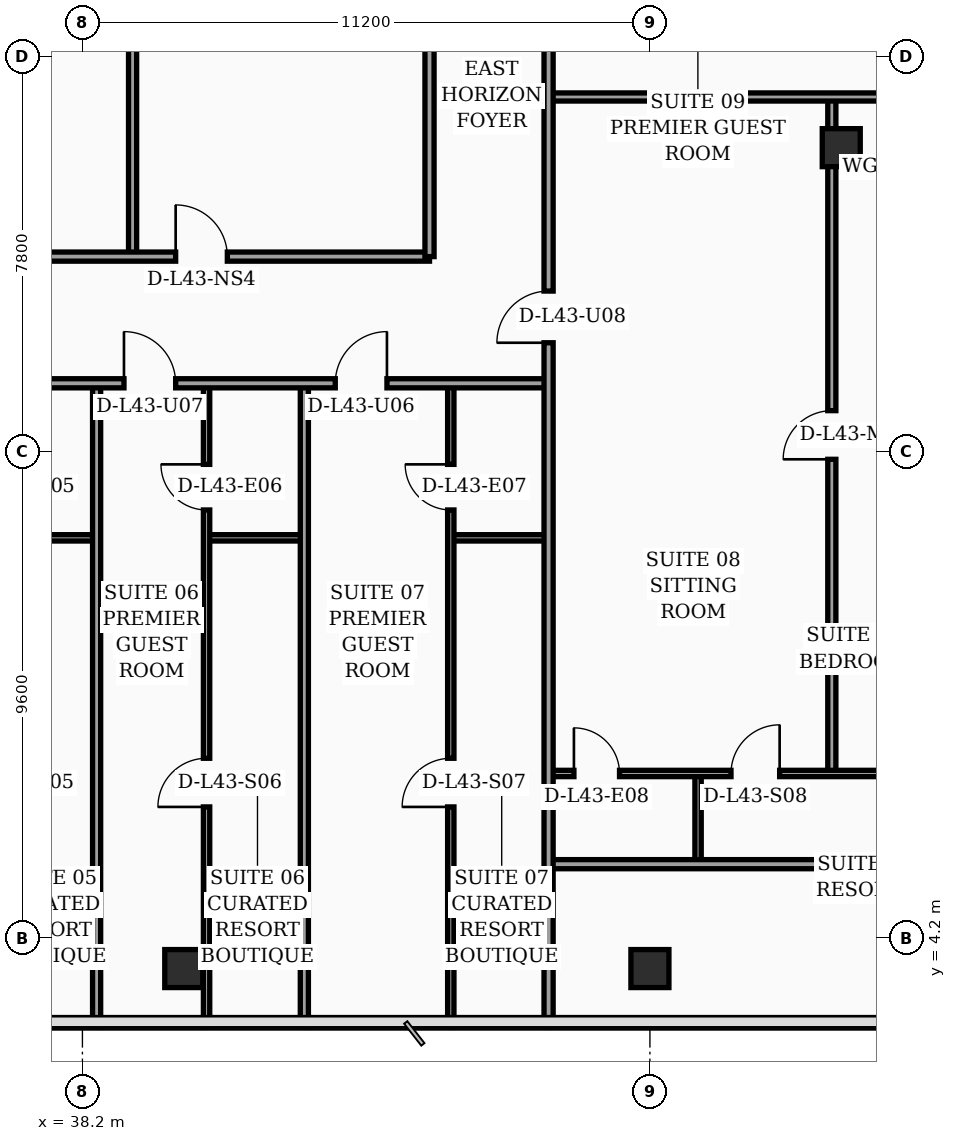
"""IFC4 building model, lengths in metres.
Left out: names, types, materials, properties, quantities, classifications, styles, units other than length and angle.
Written with IfcOpenShell. Run it as: python <this file> out.ifc"""

import sys

from ifc_helpers import new_model, si_unit, direction, frame, frame_2d, origin, origin_2d, place, context, subcontext, project, spatial, rectangle, hollow_rectangle, extrude, element, fill, save


model = new_model("IFC4")
c1 = context("Model", 3, precision=1e-05, world=origin(), true_north=direction((0.0, 1.0)))
c2 = subcontext(c1, "Body", "Model", "MODEL_VIEW")
j1 = project(units=[si_unit("LENGTHUNIT", "METRE"), si_unit("PLANEANGLEUNIT", "RADIAN")], contexts=[c1])
p1 = place(None, origin())
s1 = spatial("IfcSite", under=j1, at=p1, CompositionType="ELEMENT")
p2 = place(p1, origin())
s2 = spatial("IfcBuilding", under=s1, at=p2, CompositionType="ELEMENT")
p3 = place(p2, frame((0.0, 0.0, 175.1)))
s3 = spatial("IfcBuildingStorey", under=s2, at=p3, CompositionType="ELEMENT", Elevation=175.1)
for number, where, z_axis, x_axis in (
    (1, (40.2, 3.6, 0.0), (0.0, 0.0, 1.0), (1.0, 0.0, 0.0)),
    (2, (49.4, 3.6, 0.0), (0.0, 0.0, 1.0), (1.0, 0.0, 0.0)),
    (3, (53.176, 19.8, 0.0), (0.0, 0.0, 1.0), (1.0, 0.0, 0.0)),
):
    element("IfcColumn", number, at=place(p3, frame(where, z_axis=z_axis, x_axis=x_axis)), inside=s3, PredefinedType="COLUMN", context=c2, shape_type="SweptSolid", body=[
        extrude(hollow_rectangle(XDim=0.75, YDim=0.75, WallThickness=0.032, at=origin_2d()), origin(), (0.0, 0.0, 1.0), 3.56),
    ])
p4 = place(p3, frame((59.23, 5.505, 0.0), z_axis=(0.0, 0.0, 1.0), x_axis=(-0.300509063924, 0.953778958931, 0.0)))
e4 = element("IfcWall", 4, at=p4, inside=s3, PredefinedType="SOLIDWALL", context=c2, shape_type="SweptSolid", body=[
    extrude(rectangle(XDim=30.814, YDim=0.32, at=frame_2d((15.407, 0.0))), origin(), (0.0, 0.0, 1.0), 3.56),
])
p5 = place(p4, frame((10.199, 0.0, 0.0)))
e5 = element("IfcOpeningElement", 5, at=p5, cuts=e4, PredefinedType="OPENING", context=c2, shape_type="SweptSolid", body=[
    extrude(rectangle(XDim=1.4, YDim=2.25, at=frame_2d((0.7, 1.125))), frame((0.0, 0.17, 0.0), z_axis=(0.0, -1.0, 0.0), x_axis=(1.0, 0.0, 0.0)), (0.0, 0.0, 1.0), 0.34),
])
p6 = place(p4, frame((2.65, 0.0, 0.75)))
e6 = element("IfcOpeningElement", 6, at=p6, cuts=e4, PredefinedType="OPENING", context=c2, shape_type="SweptSolid", body=[
    extrude(rectangle(XDim=1.5, YDim=1.6, at=frame_2d((0.75, 0.8))), frame((0.0, 0.17, 0.0), z_axis=(0.0, -1.0, 0.0), x_axis=(1.0, 0.0, 0.0)), (0.0, 0.0, 1.0), 0.34),
])
p7 = place(p4, frame((4.7, 0.0, 0.75)))
e7 = element("IfcOpeningElement", 7, at=p7, cuts=e4, PredefinedType="OPENING", context=c2, shape_type="SweptSolid", body=[
    extrude(rectangle(XDim=1.5, YDim=1.6, at=frame_2d((0.75, 0.8))), frame((0.0, 0.17, 0.0), z_axis=(0.0, -1.0, 0.0), x_axis=(1.0, 0.0, 0.0)), (0.0, 0.0, 1.0), 0.34),
])
p8 = place(p4, frame((7.8, 0.0, 0.75)))
e8 = element("IfcOpeningElement", 8, at=p8, cuts=e4, PredefinedType="OPENING", context=c2, shape_type="SweptSolid", body=[
    extrude(rectangle(XDim=1.5, YDim=1.6, at=frame_2d((0.75, 0.8))), frame((0.0, 0.17, 0.0), z_axis=(0.0, -1.0, 0.0), x_axis=(1.0, 0.0, 0.0)), (0.0, 0.0, 1.0), 0.34),
])
p9 = place(p4, frame((14.0, 0.0, 0.75)))
e9 = element("IfcOpeningElement", 9, at=p9, cuts=e4, PredefinedType="OPENING", context=c2, shape_type="SweptSolid", body=[
    extrude(rectangle(XDim=1.5, YDim=1.6, at=frame_2d((0.75, 0.8))), frame((0.0, 0.17, 0.0), z_axis=(0.0, -1.0, 0.0), x_axis=(1.0, 0.0, 0.0)), (0.0, 0.0, 1.0), 0.34),
])
p10 = place(p4, frame((17.1, 0.0, 0.75)))
e10 = element("IfcOpeningElement", 10, at=p10, cuts=e4, PredefinedType="OPENING", context=c2, shape_type="SweptSolid", body=[
    extrude(rectangle(XDim=1.5, YDim=1.6, at=frame_2d((0.75, 0.8))), frame((0.0, 0.17, 0.0), z_axis=(0.0, -1.0, 0.0), x_axis=(1.0, 0.0, 0.0)), (0.0, 0.0, 1.0), 0.34),
])
p11 = place(p4, frame((20.2, 0.0, 0.75)))
e11 = element("IfcOpeningElement", 11, at=p11, cuts=e4, PredefinedType="OPENING", context=c2, shape_type="SweptSolid", body=[
    extrude(rectangle(XDim=1.5, YDim=1.6, at=frame_2d((0.75, 0.8))), frame((0.0, 0.17, 0.0), z_axis=(0.0, -1.0, 0.0), x_axis=(1.0, 0.0, 0.0)), (0.0, 0.0, 1.0), 0.34),
])
p12 = place(p4, frame((26.4, 0.0, 0.75)))
e12 = element("IfcOpeningElement", 12, at=p12, cuts=e4, PredefinedType="OPENING", context=c2, shape_type="SweptSolid", body=[
    extrude(rectangle(XDim=1.5, YDim=1.6, at=frame_2d((0.75, 0.8))), frame((0.0, 0.17, 0.0), z_axis=(0.0, -1.0, 0.0), x_axis=(1.0, 0.0, 0.0)), (0.0, 0.0, 1.0), 0.34),
])
p13 = place(p3, frame((36.55, 12.1, 0.0), z_axis=(0.0, 0.0, 1.0), x_axis=(1.0, 0.0, 0.0)))
e13 = element("IfcWall", 13, at=p13, inside=s3, PredefinedType="PARTITIONING", context=c2, shape_type="SweptSolid", body=[
    extrude(rectangle(XDim=1.93, YDim=0.125, at=frame_2d((0.965, 0.0))), origin(), (0.0, 0.0, 1.0), 3.56),
])
p14 = place(p3, frame((40.65, 12.1, 0.0), z_axis=(0.0, 0.0, 1.0), x_axis=(1.0, 0.0, 0.0)))
e14 = element("IfcWall", 14, at=p14, inside=s3, PredefinedType="PARTITIONING", context=c2, shape_type="SweptSolid", body=[
    extrude(rectangle(XDim=1.93, YDim=0.125, at=frame_2d((0.965, 0.0))), origin(), (0.0, 0.0, 1.0), 3.56),
])
p15 = place(p3, frame((40.65, 2.44, 0.0), z_axis=(0.0, 0.0, 1.0), x_axis=(0.0, 1.0, 0.0)))
e15 = element("IfcWall", 15, at=p15, inside=s3, PredefinedType="PARTITIONING", context=c2, shape_type="SweptSolid", body=[
    extrude(rectangle(XDim=12.71, YDim=0.125, at=frame_2d((6.355, 0.0))), origin(), (0.0, 0.0, 1.0), 2.94),
])
p16 = place(p15, frame((4.35, 0.0, 0.0)))
e16 = element("IfcOpeningElement", 16, at=p16, cuts=e15, PredefinedType="OPENING", context=c2, shape_type="SweptSolid", body=[
    extrude(rectangle(XDim=0.96, YDim=2.2, at=frame_2d((0.48, 1.1))), frame((0.0, 0.073, 0.0), z_axis=(0.0, -1.0, 0.0), x_axis=(1.0, 0.0, 0.0)), (0.0, 0.0, 1.0), 0.145),
])
p17 = place(p15, frame((10.21, 0.0, 0.0)))
e17 = element("IfcOpeningElement", 17, at=p17, cuts=e15, PredefinedType="OPENING", context=c2, shape_type="SweptSolid", body=[
    extrude(rectangle(XDim=0.9, YDim=2.15, at=frame_2d((0.45, 1.075))), frame((0.0, 0.073, 0.0), z_axis=(0.0, -1.0, 0.0), x_axis=(1.0, 0.0, 0.0)), (0.0, 0.0, 1.0), 0.145),
])
p18 = place(p3, frame((38.48, 2.44, 0.0), z_axis=(0.0, 0.0, 1.0), x_axis=(0.0, 1.0, 0.0)))
e18 = element("IfcWall", 18, at=p18, inside=s3, PredefinedType="PARTITIONING", context=c2, shape_type="SweptSolid", body=[
    extrude(rectangle(XDim=12.71, YDim=0.16, at=frame_2d((6.355, 0.0))), origin(), (0.0, 0.0, 1.0), 2.94),
])
p19 = place(p3, frame((45.47, 12.1, 0.0), z_axis=(0.0, 0.0, 1.0), x_axis=(1.0, 0.0, 0.0)))
e19 = element("IfcWall", 19, at=p19, inside=s3, PredefinedType="PARTITIONING", context=c2, shape_type="SweptSolid", body=[
    extrude(rectangle(XDim=1.93, YDim=0.125, at=frame_2d((0.965, 0.0))), origin(), (0.0, 0.0, 1.0), 2.94),
])
p20 = place(p3, frame((45.47, 2.44, 0.0), z_axis=(0.0, 0.0, 1.0), x_axis=(0.0, 1.0, 0.0)))
e20 = element("IfcWall", 20, at=p20, inside=s3, PredefinedType="PARTITIONING", context=c2, shape_type="SweptSolid", body=[
    extrude(rectangle(XDim=12.71, YDim=0.125, at=frame_2d((6.355, 0.0))), origin(), (0.0, 0.0, 1.0), 3.04),
])
p21 = place(p20, frame((4.35, 0.0, 0.0)))
e21 = element("IfcOpeningElement", 21, at=p21, cuts=e20, PredefinedType="OPENING", context=c2, shape_type="SweptSolid", body=[
    extrude(rectangle(XDim=0.96, YDim=2.2, at=frame_2d((0.48, 1.1))), frame((0.0, 0.073, 0.0), z_axis=(0.0, -1.0, 0.0), x_axis=(1.0, 0.0, 0.0)), (0.0, 0.0, 1.0), 0.145),
])
p22 = place(p20, frame((10.21, 0.0, 0.0)))
e22 = element("IfcOpeningElement", 22, at=p22, cuts=e20, PredefinedType="OPENING", context=c2, shape_type="SweptSolid", body=[
    extrude(rectangle(XDim=0.9, YDim=2.15, at=frame_2d((0.45, 1.075))), frame((0.0, 0.073, 0.0), z_axis=(0.0, -1.0, 0.0), x_axis=(1.0, 0.0, 0.0)), (0.0, 0.0, 1.0), 0.145),
])
p23 = place(p3, frame((42.58, 2.44, 0.0), z_axis=(0.0, 0.0, 1.0), x_axis=(0.0, 1.0, 0.0)))
e23 = element("IfcWall", 23, at=p23, inside=s3, PredefinedType="PARTITIONING", context=c2, shape_type="SweptSolid", body=[
    extrude(rectangle(XDim=12.71, YDim=0.16, at=frame_2d((6.355, 0.0))), origin(), (0.0, 0.0, 1.0), 3.04),
])
p24 = place(p3, frame((32.4, 15.15, 0.0), z_axis=(0.0, 0.0, 1.0), x_axis=(1.0, 0.0, 0.0)))
e24 = element("IfcWall", 24, at=p24, inside=s3, PredefinedType="PARTITIONING", context=c2, shape_type="SweptSolid", body=[
    extrude(rectangle(XDim=15.0, YDim=0.18, at=frame_2d((7.5, 0.0))), origin(), (0.0, 0.0, 1.0), 2.94),
])
p25 = place(p24, frame((1.66, 0.0, 0.0)))
e25 = element("IfcOpeningElement", 25, at=p25, cuts=e24, PredefinedType="OPENING", context=c2, shape_type="SweptSolid", body=[
    extrude(rectangle(XDim=1.02, YDim=2.2, at=frame_2d((0.51, 1.1))), frame((0.0, 0.1, 0.0), z_axis=(0.0, -1.0, 0.0), x_axis=(1.0, 0.0, 0.0)), (0.0, 0.0, 1.0), 0.2),
])
p26 = place(p24, frame((10.79, 0.0, 0.0)))
e26 = element("IfcOpeningElement", 26, at=p26, cuts=e24, PredefinedType="OPENING", context=c2, shape_type="SweptSolid", body=[
    extrude(rectangle(XDim=1.02, YDim=2.2, at=frame_2d((0.51, 1.1))), frame((0.0, 0.1, 0.0), z_axis=(0.0, -1.0, 0.0), x_axis=(1.0, 0.0, 0.0)), (0.0, 0.0, 1.0), 0.2),
])
p27 = place(p24, frame((6.62, 0.0, 0.0)))
e27 = element("IfcOpeningElement", 27, at=p27, cuts=e24, PredefinedType="OPENING", context=c2, shape_type="SweptSolid", body=[
    extrude(rectangle(XDim=1.02, YDim=2.2, at=frame_2d((0.51, 1.1))), frame((0.0, 0.1, 0.0), z_axis=(0.0, -1.0, 0.0), x_axis=(1.0, 0.0, 0.0)), (0.0, 0.0, 1.0), 0.2),
])
p28 = place(p3, frame((39.19, 17.65, 0.0), z_axis=(0.0, 0.0, 1.0), x_axis=(0.0, 1.0, 0.0)))
e28 = element("IfcWall", 28, at=p28, inside=s3, PredefinedType="PARTITIONING", context=c2, shape_type="SweptSolid", body=[
    extrude(rectangle(XDim=16.63, YDim=0.16, at=frame_2d((8.315, 0.0))), origin(), (0.0, 0.0, 1.0), 2.94),
])
p29 = place(p3, frame((21.5, 17.65, 0.0), z_axis=(0.0, 0.0, 1.0), x_axis=(1.0, 0.0, 0.0)))
e29 = element("IfcWall", 29, at=p29, inside=s3, PredefinedType="PARTITIONING", context=c2, shape_type="SweptSolid", body=[
    extrude(rectangle(XDim=23.55, YDim=0.18, at=frame_2d((11.775, 0.0))), origin(), (0.0, 0.0, 1.0), 2.94),
])
p30 = place(p29, frame((0.95, 0.0, 0.0)))
e30 = element("IfcOpeningElement", 30, at=p30, cuts=e29, PredefinedType="OPENING", context=c2, shape_type="SweptSolid", body=[
    extrude(rectangle(XDim=1.02, YDim=2.2, at=frame_2d((0.51, 1.1))), frame((0.0, 0.1, 0.0), z_axis=(0.0, -1.0, 0.0), x_axis=(1.0, 0.0, 0.0)), (0.0, 0.0, 1.0), 0.2),
])
p31 = place(p29, frame((7.46, 0.0, 0.0)))
e31 = element("IfcOpeningElement", 31, at=p31, cuts=e29, PredefinedType="OPENING", context=c2, shape_type="SweptSolid", body=[
    extrude(rectangle(XDim=1.02, YDim=2.2, at=frame_2d((0.51, 1.1))), frame((0.0, 0.1, 0.0), z_axis=(0.0, -1.0, 0.0), x_axis=(1.0, 0.0, 0.0)), (0.0, 0.0, 1.0), 0.2),
])
p32 = place(p29, frame((12.68, 0.0, 0.0)))
e32 = element("IfcOpeningElement", 32, at=p32, cuts=e29, PredefinedType="OPENING", context=c2, shape_type="SweptSolid", body=[
    extrude(rectangle(XDim=1.02, YDim=2.2, at=frame_2d((0.51, 1.1))), frame((0.0, 0.1, 0.0), z_axis=(0.0, -1.0, 0.0), x_axis=(1.0, 0.0, 0.0)), (0.0, 0.0, 1.0), 0.2),
])
p33 = place(p29, frame((18.54, 0.0, 0.0)))
e33 = element("IfcOpeningElement", 33, at=p33, cuts=e29, PredefinedType="OPENING", context=c2, shape_type="SweptSolid", body=[
    extrude(rectangle(XDim=1.02, YDim=2.2, at=frame_2d((0.51, 1.1))), frame((0.0, 0.1, 0.0), z_axis=(0.0, -1.0, 0.0), x_axis=(1.0, 0.0, 0.0)), (0.0, 0.0, 1.0), 0.2),
])
p34 = place(p3, frame((45.05, 17.65, 0.0), z_axis=(0.0, 0.0, 1.0), x_axis=(0.0, 1.0, 0.0)))
e34 = element("IfcWall", 34, at=p34, inside=s3, PredefinedType="PARTITIONING", context=c2, shape_type="SweptSolid", body=[
    extrude(rectangle(XDim=19.9, YDim=0.18, at=frame_2d((9.95, 0.0))), origin(), (0.0, 0.0, 1.0), 2.94),
])
p35 = place(p3, frame((50.35, 5.66, 0.0), z_axis=(0.0, 0.0, 1.0), x_axis=(0.0, 1.0, 0.0)))
e35 = element("IfcWall", 35, at=p35, inside=s3, PredefinedType="PARTITIONING", context=c2, shape_type="SweptSolid", body=[
    extrude(rectangle(XDim=1.79, YDim=0.125, at=frame_2d((0.895, 0.0))), origin(), (0.0, 0.0, 1.0), 3.56),
])
p36 = place(p3, frame((52.99, 7.45, 0.0), z_axis=(0.0, 0.0, 1.0), x_axis=(0.0, 1.0, 0.0)))
e36 = element("IfcWall", 36, at=p36, inside=s3, PredefinedType="PARTITIONING", context=c2, shape_type="SweptSolid", body=[
    extrude(rectangle(XDim=13.35, YDim=0.16, at=frame_2d((6.675, 0.0))), origin(), (0.0, 0.0, 1.0), 2.94),
])
p37 = place(p36, frame((6.2, 0.0, 0.0)))
e37 = element("IfcOpeningElement", 37, at=p37, cuts=e36, PredefinedType="OPENING", context=c2, shape_type="SweptSolid", body=[
    extrude(rectangle(XDim=0.96, YDim=2.2, at=frame_2d((0.48, 1.1))), frame((0.0, 0.09, 0.0), z_axis=(0.0, -1.0, 0.0), x_axis=(1.0, 0.0, 0.0)), (0.0, 0.0, 1.0), 0.18),
])
p38 = place(p3, frame((47.4, 7.45, 0.0), z_axis=(0.0, 0.0, 1.0), x_axis=(1.0, 0.0, 0.0)))
e38 = element("IfcWall", 38, at=p38, inside=s3, PredefinedType="PARTITIONING", context=c2, shape_type="SweptSolid", body=[
    extrude(rectangle(XDim=11.16, YDim=0.125, at=frame_2d((5.58, 0.0))), origin(), (0.0, 0.0, 1.0), 2.94),
])
p39 = place(p38, frame((0.5, 0.0, 0.0)))
e39 = element("IfcOpeningElement", 39, at=p39, cuts=e38, PredefinedType="OPENING", context=c2, shape_type="SweptSolid", body=[
    extrude(rectangle(XDim=0.9, YDim=2.15, at=frame_2d((0.45, 1.075))), frame((0.0, 0.073, 0.0), z_axis=(0.0, -1.0, 0.0), x_axis=(1.0, 0.0, 0.0)), (0.0, 0.0, 1.0), 0.145),
])
p40 = place(p38, frame((3.6, 0.0, 0.0)))
e40 = element("IfcOpeningElement", 40, at=p40, cuts=e38, PredefinedType="OPENING", context=c2, shape_type="SweptSolid", body=[
    extrude(rectangle(XDim=0.96, YDim=2.2, at=frame_2d((0.48, 1.1))), frame((0.0, 0.073, 0.0), z_axis=(0.0, -1.0, 0.0), x_axis=(1.0, 0.0, 0.0)), (0.0, 0.0, 1.0), 0.145),
])
p41 = place(p3, frame((47.4, 5.66, 0.0), z_axis=(0.0, 0.0, 1.0), x_axis=(1.0, 0.0, 0.0)))
e41 = element("IfcWall", 41, at=p41, inside=s3, PredefinedType="PARTITIONING", context=c2, shape_type="SweptSolid", body=[
    extrude(rectangle(XDim=8.6, YDim=0.18, at=frame_2d((4.3, 0.0))), origin(), (0.0, 0.0, 1.0), 2.94),
])
p42 = place(p3, frame((47.4, 20.8, 0.0), z_axis=(0.0, 0.0, 1.0), x_axis=(1.0, 0.0, 0.0)))
e42 = element("IfcWall", 42, at=p42, inside=s3, PredefinedType="PARTITIONING", context=c2, shape_type="SweptSolid", body=[
    extrude(rectangle(XDim=6.95, YDim=0.16, at=frame_2d((3.475, 0.0))), origin(), (0.0, 0.0, 1.0), 3.04),
])
p43 = place(p3, frame((47.4, 2.44, 0.0), z_axis=(0.0, 0.0, 1.0), x_axis=(0.0, 1.0, 0.0)))
e43 = element("IfcWall", 43, at=p43, inside=s3, PredefinedType="PARTITIONING", context=c2, shape_type="SweptSolid", body=[
    extrude(rectangle(XDim=27.84, YDim=0.18, at=frame_2d((13.92, 0.0))), origin(), (0.0, 0.0, 1.0), 2.94),
])
p44 = place(p43, frame((13.51, 0.0, 0.0)))
e44 = element("IfcOpeningElement", 44, at=p44, cuts=e43, PredefinedType="OPENING", context=c2, shape_type="SweptSolid", body=[
    extrude(rectangle(XDim=1.02, YDim=2.2, at=frame_2d((0.51, 1.1))), frame((0.0, 0.1, 0.0), z_axis=(0.0, -1.0, 0.0), x_axis=(1.0, 0.0, 0.0)), (0.0, 0.0, 1.0), 0.2),
])
p45 = place(p43, frame((21.52, 0.0, 0.0)))
e45 = element("IfcOpeningElement", 45, at=p45, cuts=e43, PredefinedType="OPENING", context=c2, shape_type="SweptSolid", body=[
    extrude(rectangle(XDim=1.02, YDim=2.2, at=frame_2d((0.51, 1.1))), frame((0.0, 0.1, 0.0), z_axis=(0.0, -1.0, 0.0), x_axis=(1.0, 0.0, 0.0)), (0.0, 0.0, 1.0), 0.2),
])
p46 = place(p16, origin())
e46 = element("IfcDoor", 46, at=p46, inside=s3, OperationType="SINGLE_SWING_LEFT", PredefinedType="DOOR", context=c2, shape_type="SweptSolid", body=[
    extrude(rectangle(XDim=0.96, YDim=2.2, at=frame_2d((0.48, 1.1))), frame((0.0, 0.025, 0.0), z_axis=(0.0, -1.0, 0.0), x_axis=(1.0, 0.0, 0.0)), (0.0, 0.0, 1.0), 0.05),
])
fill(e16, e46)
p47 = place(p17, origin())
e47 = element("IfcDoor", 47, at=p47, inside=s3, OperationType="SINGLE_SWING_RIGHT", PredefinedType="DOOR", context=c2, shape_type="SweptSolid", body=[
    extrude(rectangle(XDim=0.9, YDim=2.15, at=frame_2d((0.45, 1.075))), frame((0.0, 0.025, 0.0), z_axis=(0.0, -1.0, 0.0), x_axis=(1.0, 0.0, 0.0)), (0.0, 0.0, 1.0), 0.05),
])
fill(e17, e47)
p48 = place(p21, origin())
e48 = element("IfcDoor", 48, at=p48, inside=s3, OperationType="SINGLE_SWING_LEFT", PredefinedType="DOOR", context=c2, shape_type="SweptSolid", body=[
    extrude(rectangle(XDim=0.96, YDim=2.2, at=frame_2d((0.48, 1.1))), frame((0.0, 0.025, 0.0), z_axis=(0.0, -1.0, 0.0), x_axis=(1.0, 0.0, 0.0)), (0.0, 0.0, 1.0), 0.05),
])
fill(e21, e48)
p49 = place(p22, origin())
e49 = element("IfcDoor", 49, at=p49, inside=s3, OperationType="SINGLE_SWING_RIGHT", PredefinedType="DOOR", context=c2, shape_type="SweptSolid", body=[
    extrude(rectangle(XDim=0.9, YDim=2.15, at=frame_2d((0.45, 1.075))), frame((0.0, 0.025, 0.0), z_axis=(0.0, -1.0, 0.0), x_axis=(1.0, 0.0, 0.0)), (0.0, 0.0, 1.0), 0.05),
])
fill(e22, e49)
p50 = place(p26, origin())
e50 = element("IfcDoor", 50, at=p50, inside=s3, OperationType="SINGLE_SWING_RIGHT", PredefinedType="DOOR", context=c2, shape_type="SweptSolid", body=[
    extrude(rectangle(XDim=1.02, YDim=2.2, at=frame_2d((0.51, 1.1))), frame((0.0, 0.025, 0.0), z_axis=(0.0, -1.0, 0.0), x_axis=(1.0, 0.0, 0.0)), (0.0, 0.0, 1.0), 0.05),
])
fill(e26, e50)
p51 = place(p27, origin())
e51 = element("IfcDoor", 51, at=p51, inside=s3, OperationType="SINGLE_SWING_LEFT", PredefinedType="DOOR", context=c2, shape_type="SweptSolid", body=[
    extrude(rectangle(XDim=1.02, YDim=2.2, at=frame_2d((0.51, 1.1))), frame((0.0, 0.025, 0.0), z_axis=(0.0, -1.0, 0.0), x_axis=(1.0, 0.0, 0.0)), (0.0, 0.0, 1.0), 0.05),
])
fill(e27, e51)
p52 = place(p33, origin())
e52 = element("IfcDoor", 52, at=p52, inside=s3, OperationType="SINGLE_SWING_LEFT", PredefinedType="DOOR", context=c2, shape_type="SweptSolid", body=[
    extrude(rectangle(XDim=1.02, YDim=2.2, at=frame_2d((0.51, 1.1))), frame((0.0, 0.025, 0.0), z_axis=(0.0, -1.0, 0.0), x_axis=(1.0, 0.0, 0.0)), (0.0, 0.0, 1.0), 0.05),
])
fill(e33, e52)
p53 = place(p37, origin())
e53 = element("IfcDoor", 53, at=p53, inside=s3, OperationType="SINGLE_SWING_LEFT", PredefinedType="DOOR", context=c2, shape_type="SweptSolid", body=[
    extrude(rectangle(XDim=0.96, YDim=2.2, at=frame_2d((0.48, 1.1))), frame((0.0, 0.025, 0.0), z_axis=(0.0, -1.0, 0.0), x_axis=(1.0, 0.0, 0.0)), (0.0, 0.0, 1.0), 0.05),
])
fill(e37, e53)
p54 = place(p39, origin())
e54 = element("IfcDoor", 54, at=p54, inside=s3, OperationType="SINGLE_SWING_LEFT", PredefinedType="DOOR", context=c2, shape_type="SweptSolid", body=[
    extrude(rectangle(XDim=0.9, YDim=2.15, at=frame_2d((0.45, 1.075))), frame((0.0, 0.025, 0.0), z_axis=(0.0, -1.0, 0.0), x_axis=(1.0, 0.0, 0.0)), (0.0, 0.0, 1.0), 0.05),
])
fill(e39, e54)
p55 = place(p40, origin())
e55 = element("IfcDoor", 55, at=p55, inside=s3, OperationType="SINGLE_SWING_RIGHT", PredefinedType="DOOR", context=c2, shape_type="SweptSolid", body=[
    extrude(rectangle(XDim=0.96, YDim=2.2, at=frame_2d((0.48, 1.1))), frame((0.0, 0.025, 0.0), z_axis=(0.0, -1.0, 0.0), x_axis=(1.0, 0.0, 0.0)), (0.0, 0.0, 1.0), 0.05),
])
fill(e40, e55)
p56 = place(p44, origin())
e56 = element("IfcDoor", 56, at=p56, inside=s3, OperationType="SINGLE_SWING_LEFT", PredefinedType="DOOR", context=c2, shape_type="SweptSolid", body=[
    extrude(rectangle(XDim=1.02, YDim=2.2, at=frame_2d((0.51, 1.1))), frame((0.0, 0.025, 0.0), z_axis=(0.0, -1.0, 0.0), x_axis=(1.0, 0.0, 0.0)), (0.0, 0.0, 1.0), 0.05),
])
fill(e44, e56)
save(model, sys.argv[1])
